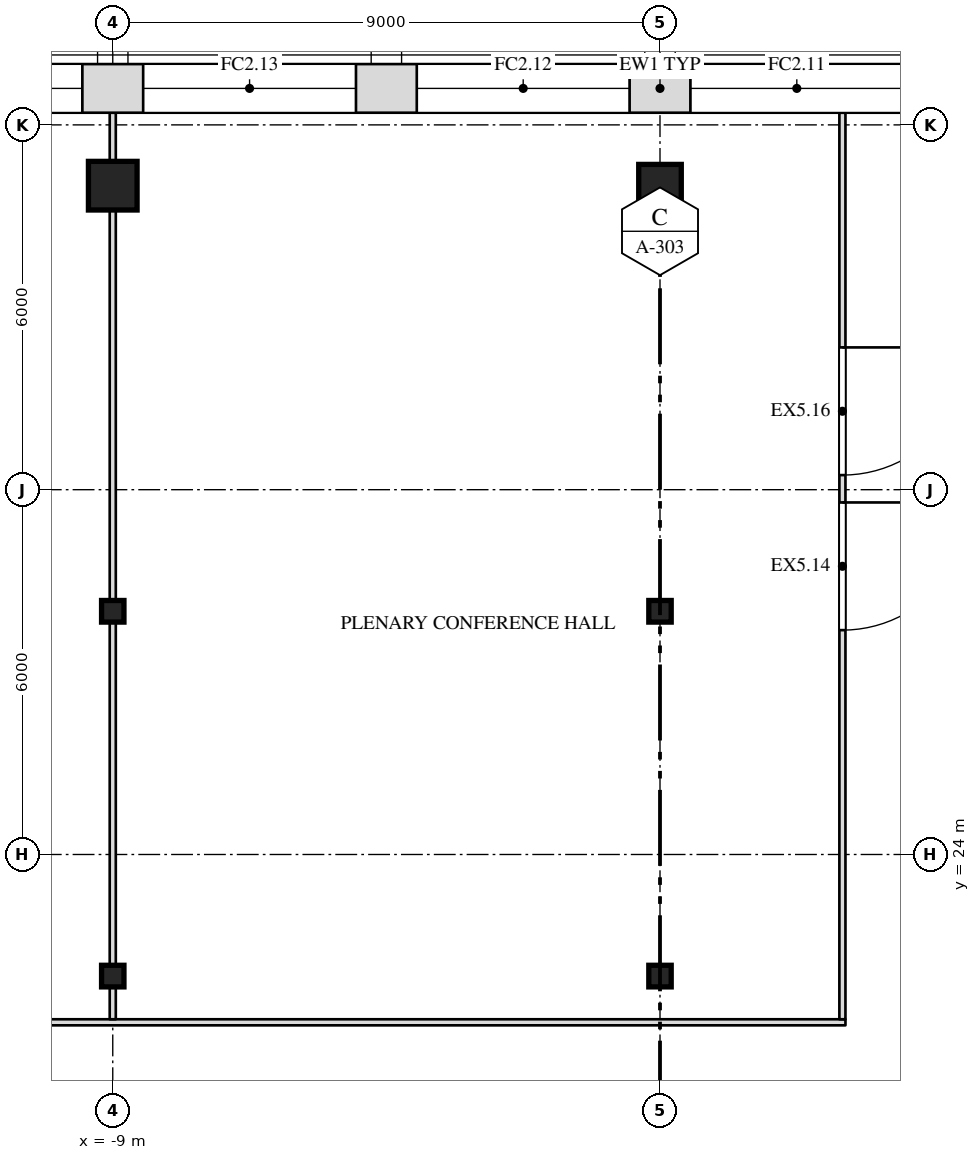
"""IFC4 building model, lengths in metres.
Left out: names, types, materials, properties, quantities, classifications, styles, units other than length and angle.
Written with IfcOpenShell. Run it as: python <this file> out.ifc"""

import sys

from ifc_helpers import new_model, si_unit, direction, frame, frame_2d, origin, origin_2d, place, context, subcontext, project, spatial, rectangle, i_section, extrude, element, fill, save


model = new_model("IFC4")
c1 = context("Model", 3, precision=1e-05, world=origin(), true_north=direction((0.0, 1.0)))
c2 = subcontext(c1, "Body", "Model", "MODEL_VIEW")
j1 = project(units=[si_unit("LENGTHUNIT", "METRE"), si_unit("PLANEANGLEUNIT", "RADIAN")], contexts=[c1])
p1 = place(None, origin())
s1 = spatial("IfcSite", under=j1, at=p1, CompositionType="ELEMENT")
p2 = place(p1, origin())
s2 = spatial("IfcBuilding", under=s1, at=p2, CompositionType="ELEMENT")
p3 = place(p2, frame((0.0, 0.0, 288.5)))
s3 = spatial("IfcBuildingStorey", under=s2, at=p3, CompositionType="ELEMENT", Elevation=288.5)
for number, where, z_axis, x_axis in (
    (1, (-9.0, 22.0, 0.0), (0.0, 0.0, 1.0), (1.0, 0.0, 0.0)),
    (2, (0.0, 22.0, 0.0), (0.0, 0.0, 1.0), (1.0, 0.0, 0.0)),
    (3, (-9.0, 28.0, 0.0), (0.0, 0.0, 1.0), (1.0, 0.0, 0.0)),
    (4, (0.0, 28.0, 0.0), (0.0, 0.0, 1.0), (1.0, 0.0, 0.0)),
):
    element("IfcColumn", number, at=place(p3, frame(where, z_axis=z_axis, x_axis=x_axis)), inside=s3, PredefinedType="COLUMN", context=c2, shape_type="SweptSolid", body=[
        extrude(i_section(OverallWidth=0.368, OverallDepth=0.356, WebThickness=0.011, FlangeThickness=0.018, at=origin_2d()), origin(), (0.0, 0.0, 1.0), 4.0),
    ])
p4 = place(p3, frame((-9.0, 35.0, 0.0), z_axis=(0.0, 0.0, 1.0), x_axis=(1.0, 0.0, 0.0)))
e5 = element("IfcColumn", 5, at=p4, inside=s3, PredefinedType="COLUMN", context=c2, shape_type="SweptSolid", body=[
    extrude(rectangle(XDim=0.8, YDim=0.8, at=origin_2d()), origin(), (0.0, 0.0, 1.0), 4.0),
])
p5 = place(p3, frame((0.0, 35.0, 0.0), z_axis=(0.0, 0.0, 1.0), x_axis=(1.0, 0.0, 0.0)))
e6 = element("IfcColumn", 6, at=p5, inside=s3, PredefinedType="COLUMN", context=c2, shape_type="SweptSolid", body=[
    extrude(rectangle(XDim=0.7, YDim=0.7, at=origin_2d()), origin(), (0.0, 0.0, 1.0), 4.0),
])
p6 = place(p3, frame((-32.2, 21.24, 0.0), z_axis=(0.0, 0.0, 1.0), x_axis=(1.0, 0.0, 0.0)))
e7 = element("IfcWall", 7, at=p6, inside=s3, PredefinedType="PARTITIONING", context=c2, shape_type="SweptSolid", body=[
    extrude(rectangle(XDim=35.25, YDim=0.1, at=frame_2d((17.625, 0.0))), origin(), (0.0, 0.0, 1.0), 3.78),
])
p7 = place(p6, frame((1.15, 0.0, 0.0)))
e8 = element("IfcOpeningElement", 8, at=p7, cuts=e7, PredefinedType="OPENING", context=c2, shape_type="SweptSolid", body=[
    extrude(rectangle(XDim=0.9, YDim=2.1, at=frame_2d((0.45, 1.05))), frame((0.0, 0.062, 0.0), z_axis=(0.0, -1.0, 0.0), x_axis=(1.0, 0.0, 0.0)), (0.0, 0.0, 1.0), 0.124),
])
p8 = place(p6, frame((11.9, 0.0, 0.0)))
e9 = element("IfcOpeningElement", 9, at=p8, cuts=e7, PredefinedType="OPENING", context=c2, shape_type="SweptSolid", body=[
    extrude(rectangle(XDim=1.8, YDim=2.1, at=frame_2d((0.9, 1.05))), frame((0.0, 0.062, 0.0), z_axis=(0.0, -1.0, 0.0), x_axis=(1.0, 0.0, 0.0)), (0.0, 0.0, 1.0), 0.124),
])
p9 = place(p3, frame((-9.0, 21.29, 0.0), z_axis=(0.0, 0.0, 1.0), x_axis=(0.0, 1.0, 0.0)))
e10 = element("IfcWall", 10, at=p9, inside=s3, PredefinedType="PARTITIONING", context=c2, shape_type="SweptSolid", body=[
    extrude(rectangle(XDim=0.532, YDim=0.1, at=frame_2d((0.266, 0.0))), origin(), (0.0, 0.0, 1.0), 3.247),
])
p10 = place(p3, frame((-9.0, 22.178, 0.0), z_axis=(0.0, 0.0, 1.0), x_axis=(0.0, 1.0, 0.0)))
e11 = element("IfcWall", 11, at=p10, inside=s3, PredefinedType="PARTITIONING", context=c2, shape_type="SweptSolid", body=[
    extrude(rectangle(XDim=5.645, YDim=0.1, at=frame_2d((2.822, 0.0))), origin(), (0.0, 0.0, 1.0), 3.247),
])
p11 = place(p3, frame((-9.0, 28.178, 0.0), z_axis=(0.0, 0.0, 1.0), x_axis=(0.0, 1.0, 0.0)))
e12 = element("IfcWall", 12, at=p11, inside=s3, PredefinedType="PARTITIONING", context=c2, shape_type="SweptSolid", body=[
    extrude(rectangle(XDim=6.422, YDim=0.1, at=frame_2d((3.211, 0.0))), origin(), (0.0, 0.0, 1.0), 3.247),
])
p12 = place(p3, frame((-9.0, 35.4, 0.0), z_axis=(0.0, 0.0, 1.0), x_axis=(0.0, 1.0, 0.0)))
e13 = element("IfcWall", 13, at=p12, inside=s3, PredefinedType="PARTITIONING", context=c2, shape_type="SweptSolid", body=[
    extrude(rectangle(XDim=0.8, YDim=0.1, at=frame_2d((0.4, 0.0))), origin(), (0.0, 0.0, 1.0), 3.78),
])
p13 = place(p3, frame((3.0, 21.29, 0.0), z_axis=(0.0, 0.0, 1.0), x_axis=(0.0, 1.0, 0.0)))
e14 = element("IfcWall", 14, at=p13, inside=s3, PredefinedType="PARTITIONING", context=c2, shape_type="SweptSolid", body=[
    extrude(rectangle(XDim=14.91, YDim=0.1, at=frame_2d((7.455, 0.0))), origin(), (0.0, 0.0, 1.0), 3.78),
])
p14 = place(p13, frame((6.4, 0.0, 0.0)))
e15 = element("IfcOpeningElement", 15, at=p14, cuts=e14, PredefinedType="OPENING", context=c2, shape_type="SweptSolid", body=[
    extrude(rectangle(XDim=2.1, YDim=2.4, at=frame_2d((1.05, 1.2))), frame((0.0, 0.062, 0.0), z_axis=(0.0, -1.0, 0.0), x_axis=(1.0, 0.0, 0.0)), (0.0, 0.0, 1.0), 0.124),
])
p15 = place(p13, frame((8.95, 0.0, 0.0)))
e16 = element("IfcOpeningElement", 16, at=p15, cuts=e14, PredefinedType="OPENING", context=c2, shape_type="SweptSolid", body=[
    extrude(rectangle(XDim=2.1, YDim=2.4, at=frame_2d((1.05, 1.2))), frame((0.0, 0.062, 0.0), z_axis=(0.0, -1.0, 0.0), x_axis=(1.0, 0.0, 0.0)), (0.0, 0.0, 1.0), 0.124),
])
p16 = place(p3, frame((26.948, 36.6, 0.0), z_axis=(0.0, 0.0, 1.0), x_axis=(-1.0, 0.0, 0.0)))
e17 = element("IfcWall", 17, at=p16, inside=s3, PredefinedType="SOLIDWALL", context=c2, shape_type="SweptSolid", body=[
    extrude(rectangle(XDim=53.895, YDim=0.8, at=frame_2d((26.948, 0.0))), origin(), (0.0, 0.0, 1.0), 3.78),
])
p17 = place(p16, frame((4.948, 0.0, 1.0)))
e18 = element("IfcOpeningElement", 18, at=p17, cuts=e17, PredefinedType="OPENING", context=c2, shape_type="SweptSolid", body=[
    extrude(rectangle(XDim=3.5, YDim=2.5, at=frame_2d((1.75, 1.25))), frame((0.0, 0.412, 0.0), z_axis=(0.0, -1.0, 0.0), x_axis=(1.0, 0.0, 0.0)), (0.0, 0.0, 1.0), 0.824),
])
p18 = place(p16, frame((9.448, 0.0, 1.0)))
e19 = element("IfcOpeningElement", 19, at=p18, cuts=e17, PredefinedType="OPENING", context=c2, shape_type="SweptSolid", body=[
    extrude(rectangle(XDim=3.5, YDim=2.5, at=frame_2d((1.75, 1.25))), frame((0.0, 0.412, 0.0), z_axis=(0.0, -1.0, 0.0), x_axis=(1.0, 0.0, 0.0)), (0.0, 0.0, 1.0), 0.824),
])
p19 = place(p16, frame((13.948, 0.0, 1.0)))
e20 = element("IfcOpeningElement", 20, at=p19, cuts=e17, PredefinedType="OPENING", context=c2, shape_type="SweptSolid", body=[
    extrude(rectangle(XDim=3.5, YDim=2.5, at=frame_2d((1.75, 1.25))), frame((0.0, 0.412, 0.0), z_axis=(0.0, -1.0, 0.0), x_axis=(1.0, 0.0, 0.0)), (0.0, 0.0, 1.0), 0.824),
])
p20 = place(p16, frame((18.448, 0.0, 1.0)))
e21 = element("IfcOpeningElement", 21, at=p20, cuts=e17, PredefinedType="OPENING", context=c2, shape_type="SweptSolid", body=[
    extrude(rectangle(XDim=3.5, YDim=2.5, at=frame_2d((1.75, 1.25))), frame((0.0, 0.412, 0.0), z_axis=(0.0, -1.0, 0.0), x_axis=(1.0, 0.0, 0.0)), (0.0, 0.0, 1.0), 0.824),
])
p21 = place(p16, frame((22.948, 0.0, 1.0)))
e22 = element("IfcOpeningElement", 22, at=p21, cuts=e17, PredefinedType="OPENING", context=c2, shape_type="SweptSolid", body=[
    extrude(rectangle(XDim=3.5, YDim=2.5, at=frame_2d((1.75, 1.25))), frame((0.0, 0.412, 0.0), z_axis=(0.0, -1.0, 0.0), x_axis=(1.0, 0.0, 0.0)), (0.0, 0.0, 1.0), 0.824),
])
p22 = place(p16, frame((27.448, 0.0, 1.0)))
e23 = element("IfcOpeningElement", 23, at=p22, cuts=e17, PredefinedType="OPENING", context=c2, shape_type="SweptSolid", body=[
    extrude(rectangle(XDim=3.5, YDim=2.5, at=frame_2d((1.75, 1.25))), frame((0.0, 0.412, 0.0), z_axis=(0.0, -1.0, 0.0), x_axis=(1.0, 0.0, 0.0)), (0.0, 0.0, 1.0), 0.824),
])
p23 = place(p16, frame((31.948, 0.0, 1.0)))
e24 = element("IfcOpeningElement", 24, at=p23, cuts=e17, PredefinedType="OPENING", context=c2, shape_type="SweptSolid", body=[
    extrude(rectangle(XDim=3.5, YDim=2.5, at=frame_2d((1.75, 1.25))), frame((0.0, 0.412, 0.0), z_axis=(0.0, -1.0, 0.0), x_axis=(1.0, 0.0, 0.0)), (0.0, 0.0, 1.0), 0.824),
])
p24 = place(p16, frame((36.448, 0.0, 1.0)))
e25 = element("IfcOpeningElement", 25, at=p24, cuts=e17, PredefinedType="OPENING", context=c2, shape_type="SweptSolid", body=[
    extrude(rectangle(XDim=3.5, YDim=2.5, at=frame_2d((1.75, 1.25))), frame((0.0, 0.412, 0.0), z_axis=(0.0, -1.0, 0.0), x_axis=(1.0, 0.0, 0.0)), (0.0, 0.0, 1.0), 0.824),
])
p25 = place(p16, frame((40.948, 0.0, 1.0)))
e26 = element("IfcOpeningElement", 26, at=p25, cuts=e17, PredefinedType="OPENING", context=c2, shape_type="SweptSolid", body=[
    extrude(rectangle(XDim=3.5, YDim=2.5, at=frame_2d((1.75, 1.25))), frame((0.0, 0.412, 0.0), z_axis=(0.0, -1.0, 0.0), x_axis=(1.0, 0.0, 0.0)), (0.0, 0.0, 1.0), 0.824),
])
p26 = place(p16, frame((45.448, 0.0, 1.0)))
e27 = element("IfcOpeningElement", 27, at=p26, cuts=e17, PredefinedType="OPENING", context=c2, shape_type="SweptSolid", body=[
    extrude(rectangle(XDim=3.5, YDim=2.5, at=frame_2d((1.75, 1.25))), frame((0.0, 0.412, 0.0), z_axis=(0.0, -1.0, 0.0), x_axis=(1.0, 0.0, 0.0)), (0.0, 0.0, 1.0), 0.824),
])
p27 = place(p14, origin())
e28 = element("IfcDoor", 28, at=p27, inside=s3, OperationType="DOUBLE_DOOR_SINGLE_SWING", PredefinedType="DOOR", context=c2, shape_type="SweptSolid", body=[
    extrude(rectangle(XDim=2.1, YDim=2.4, at=frame_2d((1.05, 1.2))), frame((0.0, 0.025, 0.0), z_axis=(0.0, -1.0, 0.0), x_axis=(1.0, 0.0, 0.0)), (0.0, 0.0, 1.0), 0.05),
])
fill(e15, e28)
p28 = place(p15, origin())
e29 = element("IfcDoor", 29, at=p28, inside=s3, OperationType="DOUBLE_DOOR_SINGLE_SWING", PredefinedType="DOOR", context=c2, shape_type="SweptSolid", body=[
    extrude(rectangle(XDim=2.1, YDim=2.4, at=frame_2d((1.05, 1.2))), frame((0.0, 0.025, 0.0), z_axis=(0.0, -1.0, 0.0), x_axis=(1.0, 0.0, 0.0)), (0.0, 0.0, 1.0), 0.05),
])
fill(e16, e29)
p29 = place(p21, origin())
e30 = element("IfcWindow", 30, at=p29, inside=s3, PartitioningType="SINGLE_PANEL", PredefinedType="WINDOW", context=c2, shape_type="SweptSolid", body=[
    extrude(rectangle(XDim=3.5, YDim=2.5, at=frame_2d((1.75, 1.25))), frame((0.0, 0.03, 0.0), z_axis=(0.0, -1.0, 0.0), x_axis=(1.0, 0.0, 0.0)), (0.0, 0.0, 1.0), 0.06),
])
fill(e22, e30)
p30 = place(p22, origin())
e31 = element("IfcWindow", 31, at=p30, inside=s3, PartitioningType="SINGLE_PANEL", PredefinedType="WINDOW", context=c2, shape_type="SweptSolid", body=[
    extrude(rectangle(XDim=3.5, YDim=2.5, at=frame_2d((1.75, 1.25))), frame((0.0, 0.03, 0.0), z_axis=(0.0, -1.0, 0.0), x_axis=(1.0, 0.0, 0.0)), (0.0, 0.0, 1.0), 0.06),
])
fill(e23, e31)
p31 = place(p23, origin())
e32 = element("IfcWindow", 32, at=p31, inside=s3, PartitioningType="SINGLE_PANEL", PredefinedType="WINDOW", context=c2, shape_type="SweptSolid", body=[
    extrude(rectangle(XDim=3.5, YDim=2.5, at=frame_2d((1.75, 1.25))), frame((0.0, 0.03, 0.0), z_axis=(0.0, -1.0, 0.0), x_axis=(1.0, 0.0, 0.0)), (0.0, 0.0, 1.0), 0.06),
])
fill(e24, e32)
p32 = place(p24, origin())
e33 = element("IfcWindow", 33, at=p32, inside=s3, PartitioningType="SINGLE_PANEL", PredefinedType="WINDOW", context=c2, shape_type="SweptSolid", body=[
    extrude(rectangle(XDim=3.5, YDim=2.5, at=frame_2d((1.75, 1.25))), frame((0.0, 0.03, 0.0), z_axis=(0.0, -1.0, 0.0), x_axis=(1.0, 0.0, 0.0)), (0.0, 0.0, 1.0), 0.06),
])
fill(e25, e33)
save(model, sys.argv[1])
